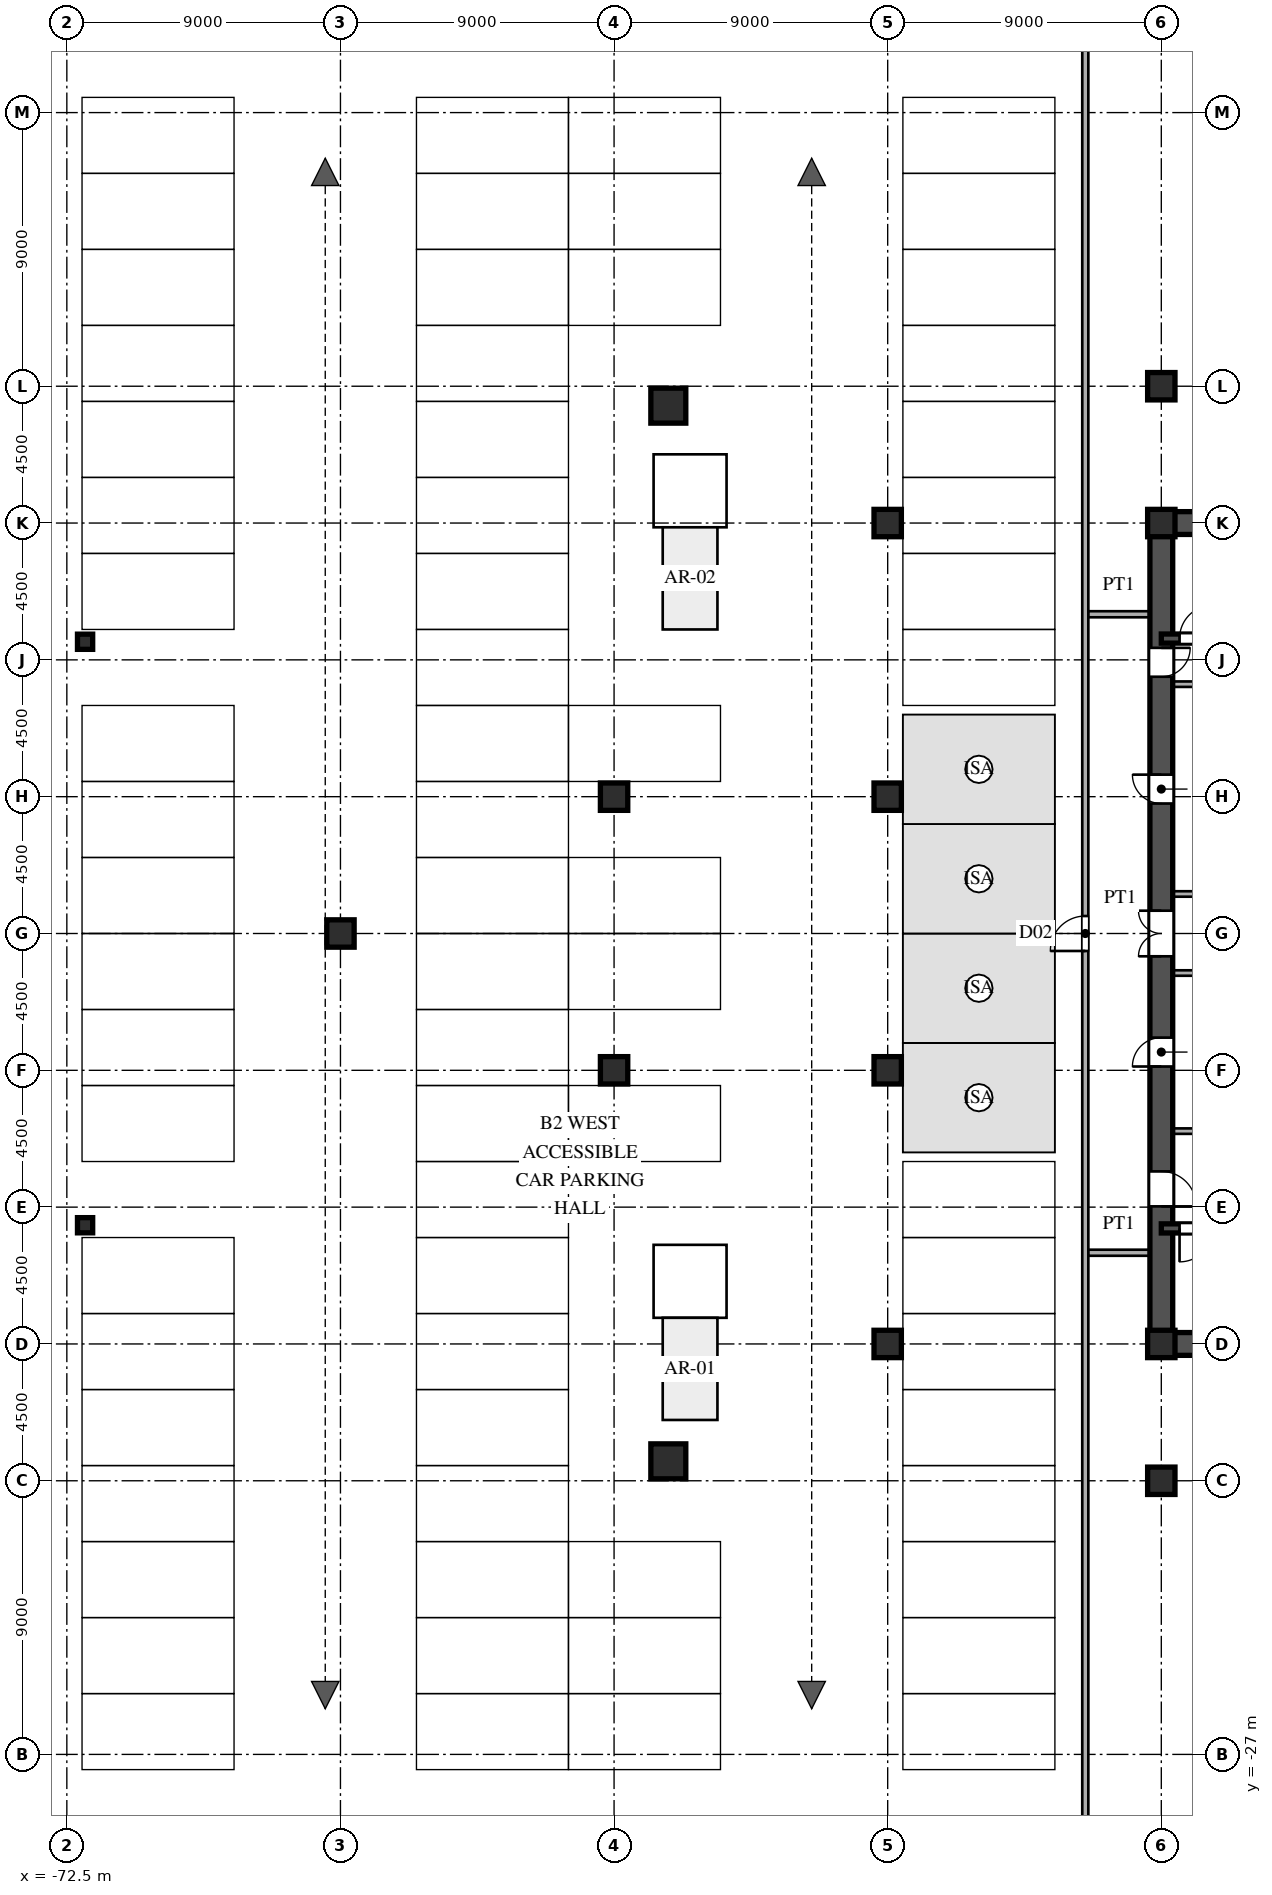
"""IFC4 building model, lengths in metres.
Left out: names, types, materials, properties, quantities, classifications, styles, units other than length and angle.
Written with IfcOpenShell. Run it as: python <this file> out.ifc"""

import sys

from ifc_helpers import new_model, si_unit, direction, frame, frame_2d, origin, origin_2d, place, context, subcontext, project, spatial, rectangle, hollow_rectangle, i_section, extrude, source, transform, mapped, element, fill, save


model = new_model("IFC4")
c1 = context("Model", 3, precision=1e-05, world=origin(), true_north=direction((0.0, 1.0)))
c2 = subcontext(c1, "Body", "Model", "MODEL_VIEW")
j1 = project(units=[si_unit("LENGTHUNIT", "METRE"), si_unit("PLANEANGLEUNIT", "RADIAN")], contexts=[c1])
p1 = place(None, origin())
s1 = spatial("IfcSite", under=j1, at=p1, CompositionType="ELEMENT")
p2 = place(p1, origin())
s2 = spatial("IfcBuilding", under=s1, at=p2, CompositionType="ELEMENT")
p3 = place(p2, frame((0.0, 0.0, -9.6)))
s3 = spatial("IfcBuildingStorey", under=s2, at=p3, CompositionType="ELEMENT", Elevation=-9.6)
m1 = source(origin(), c2, "Body", "SweptSolid", [
    extrude(i_section(OverallWidth=0.9, OverallDepth=0.9, WebThickness=0.036, FlangeThickness=0.055, at=origin_2d()), origin(), (0.0, 0.0, 1.0), 4.8),
])
for number, where, z_axis, x_axis in (
    (1, (-36.5, -18.0, 0.0), (0.0, 0.0, 1.0), (1.0, 0.0, 0.0)),
    (2, (-36.5, -13.5, 0.0), (0.0, 0.0, 1.0), (1.0, 0.0, 0.0)),
    (3, (-36.5, 13.5, 0.0), (0.0, 0.0, 1.0), (1.0, 0.0, 0.0)),
    (4, (-36.5, 18.0, 0.0), (0.0, 0.0, 1.0), (1.0, 0.0, 0.0)),
    (5, (-45.5, -13.5, 0.0), (0.0, 0.0, 1.0), (1.0, 0.0, 0.0)),
    (6, (-45.5, -4.5, 0.0), (0.0, 0.0, 1.0), (1.0, 0.0, 0.0)),
    (7, (-45.5, 4.5, 0.0), (0.0, 0.0, 1.0), (1.0, 0.0, 0.0)),
    (8, (-45.5, 13.5, 0.0), (0.0, 0.0, 1.0), (1.0, 0.0, 0.0)),
    (9, (-54.5, -4.5, 0.0), (0.0, 0.0, 1.0), (1.0, 0.0, 0.0)),
    (10, (-54.5, 4.5, 0.0), (0.0, 0.0, 1.0), (1.0, 0.0, 0.0)),
    (11, (-63.5, 0.0, 0.0), (0.0, 0.0, 1.0), (1.0, 0.0, 0.0)),
):
    element("IfcColumn", number, at=place(p3, frame(where, z_axis=z_axis, x_axis=x_axis)), inside=s3, PredefinedType="COLUMN", context=c2, shape_type="MappedRepresentation", body=[
        mapped(m1, transform((0.0, 0.0, 0.0), scale=1.0)),
    ])
m2 = source(origin(), c2, "Body", "SweptSolid", [
    extrude(hollow_rectangle(XDim=0.5, YDim=0.5, WallThickness=0.02, at=origin_2d()), origin(), (0.0, 0.0, 1.0), 4.8),
])
for number, where, z_axis, x_axis in (
    (12, (-71.9, 9.596, 0.0), (0.0, 0.0, 1.0), (1.0, 0.0, 0.0)),
    (13, (-71.9, -9.596, 0.0), (0.0, 0.0, 1.0), (1.0, 0.0, 0.0)),
):
    element("IfcColumn", number, at=place(p3, frame(where, z_axis=z_axis, x_axis=x_axis)), inside=s3, PredefinedType="COLUMN", context=c2, shape_type="MappedRepresentation", body=[
        mapped(m2, transform((0.0, 0.0, 0.0), scale=1.0)),
    ])
m3 = source(origin(), c2, "Body", "SweptSolid", [
    extrude(hollow_rectangle(XDim=1.15, YDim=1.15, WallThickness=0.048, at=origin_2d()), origin(), (0.0, 0.0, 1.0), 4.8),
])
for number, where, z_axis, x_axis in (
    (14, (-52.716, -17.361, 0.0), (0.0, 0.0, 1.0), (1.0, 0.0, 0.0)),
    (15, (-52.716, 17.361, 0.0), (0.0, 0.0, 1.0), (1.0, 0.0, 0.0)),
):
    element("IfcColumn", number, at=place(p3, frame(where, z_axis=z_axis, x_axis=x_axis)), inside=s3, PredefinedType="COLUMN", context=c2, shape_type="MappedRepresentation", body=[
        mapped(m3, transform((0.0, 0.0, 0.0), scale=1.0)),
    ])
for number, where, z_axis, x_axis in (
    (16, (-36.5, -13.5, 0.0), (0.0, 0.0, 1.0), (1.0, 0.0, 0.0)),
    (17, (-36.5, 13.5, 0.0), (0.0, 0.0, 1.0), (1.0, 0.0, 0.0)),
):
    element("IfcWall", number, at=place(p3, frame(where, z_axis=z_axis, x_axis=x_axis)), inside=s3, PredefinedType="SHEAR", context=c2, shape_type="SweptSolid", body=[
        extrude(rectangle(XDim=9.0, YDim=0.75, at=frame_2d((4.5, 0.0))), origin(), (0.0, 0.0, 1.0), 4.5),
    ])
p4 = place(p3, frame((-36.5, -13.65, 0.0), z_axis=(0.0, 0.0, 1.0), x_axis=(0.0, 1.0, 0.0)))
e18 = element("IfcWall", 18, at=p4, inside=s3, PredefinedType="SHEAR", context=c2, shape_type="SweptSolid", body=[
    extrude(rectangle(XDim=7.15, YDim=0.75, at=frame_2d((3.575, 0.0))), origin(), (0.0, 0.0, 1.0), 4.5),
])
p5 = place(p4, frame((4.675, 0.0, 0.0)))
e19 = element("IfcOpeningElement", 19, at=p5, cuts=e18, PredefinedType="OPENING", context=c2, shape_type="SweptSolid", body=[
    extrude(rectangle(XDim=1.15, YDim=2.2, at=frame_2d((0.575, 1.1))), frame((0.0, 0.385, 0.0), z_axis=(0.0, -1.0, 0.0), x_axis=(1.0, 0.0, 0.0)), (0.0, 0.0, 1.0), 0.77),
])
p6 = place(p3, frame((-36.5, -1.3, 0.0), z_axis=(0.0, 0.0, 1.0), x_axis=(0.0, 1.0, 0.0)))
e20 = element("IfcWall", 20, at=p6, inside=s3, PredefinedType="SHEAR", context=c2, shape_type="SweptSolid", body=[
    extrude(rectangle(XDim=2.6, YDim=0.75, at=frame_2d((1.3, 0.0))), origin(), (0.0, 0.0, 1.0), 4.5),
])
p7 = place(p6, frame((0.55, 0.0, 0.0)))
e21 = element("IfcOpeningElement", 21, at=p7, cuts=e20, PredefinedType="OPENING", context=c2, shape_type="SweptSolid", body=[
    extrude(rectangle(XDim=1.5, YDim=2.3, at=frame_2d((0.75, 1.15))), frame((0.0, 0.385, 0.0), z_axis=(0.0, -1.0, 0.0), x_axis=(1.0, 0.0, 0.0)), (0.0, 0.0, 1.0), 0.77),
])
p8 = place(p3, frame((-36.5, 8.2, 0.0), z_axis=(0.0, 0.0, 1.0), x_axis=(0.0, 1.0, 0.0)))
e22 = element("IfcWall", 22, at=p8, inside=s3, PredefinedType="SHEAR", context=c2, shape_type="SweptSolid", body=[
    extrude(rectangle(XDim=5.45, YDim=0.75, at=frame_2d((2.725, 0.0))), origin(), (0.0, 0.0, 1.0), 4.5),
])
p9 = place(p8, frame((0.245, 0.0, 0.0)))
e23 = element("IfcOpeningElement", 23, at=p9, cuts=e22, PredefinedType="OPENING", context=c2, shape_type="SweptSolid", body=[
    extrude(rectangle(XDim=0.95, YDim=2.15, at=frame_2d((0.475, 1.075))), frame((0.0, 0.385, 0.0), z_axis=(0.0, -1.0, 0.0), x_axis=(1.0, 0.0, 0.0)), (0.0, 0.0, 1.0), 0.77),
])
p10 = place(p3, frame((-36.5, -6.5, 0.0), z_axis=(0.0, 0.0, 1.0), x_axis=(0.0, 1.0, 0.0)))
e24 = element("IfcWall", 24, at=p10, inside=s3, PredefinedType="SHEAR", context=c2, shape_type="SweptSolid", body=[
    extrude(rectangle(XDim=5.2, YDim=0.75, at=frame_2d((2.6, 0.0))), origin(), (0.0, 0.0, 1.0), 4.5),
])
p11 = place(p10, frame((2.125, 0.0, 0.0)))
e25 = element("IfcOpeningElement", 25, at=p11, cuts=e24, PredefinedType="OPENING", context=c2, shape_type="SweptSolid", body=[
    extrude(rectangle(XDim=0.95, YDim=2.15, at=frame_2d((0.475, 1.075))), frame((0.0, 0.385, 0.0), z_axis=(0.0, -1.0, 0.0), x_axis=(1.0, 0.0, 0.0)), (0.0, 0.0, 1.0), 0.77),
])
p12 = place(p3, frame((-36.5, 1.3, 0.0), z_axis=(0.0, 0.0, 1.0), x_axis=(0.0, 1.0, 0.0)))
e26 = element("IfcWall", 26, at=p12, inside=s3, PredefinedType="SHEAR", context=c2, shape_type="SweptSolid", body=[
    extrude(rectangle(XDim=6.9, YDim=0.75, at=frame_2d((3.45, 0.0))), origin(), (0.0, 0.0, 1.0), 4.5),
])
p13 = place(p12, frame((2.975, 0.0, 0.0)))
e27 = element("IfcOpeningElement", 27, at=p13, cuts=e26, PredefinedType="OPENING", context=c2, shape_type="SweptSolid", body=[
    extrude(rectangle(XDim=0.95, YDim=2.15, at=frame_2d((0.475, 1.075))), frame((0.0, 0.385, 0.0), z_axis=(0.0, -1.0, 0.0), x_axis=(1.0, 0.0, 0.0)), (0.0, 0.0, 1.0), 0.77),
])
p14 = place(p3, frame((-36.5, -9.7, 0.0), z_axis=(0.0, 0.0, 1.0), x_axis=(1.0, 0.0, 0.0)))
e28 = element("IfcWall", 28, at=p14, inside=s3, PredefinedType="SHEAR", context=c2, shape_type="SweptSolid", body=[
    extrude(rectangle(XDim=9.0, YDim=0.3, at=frame_2d((4.5, 0.0))), origin(), (0.0, 0.0, 1.0), 4.5),
])
p15 = place(p14, frame((0.6, 0.0, 0.0)))
e29 = element("IfcOpeningElement", 29, at=p15, cuts=e28, PredefinedType="OPENING", context=c2, shape_type="SweptSolid", body=[
    extrude(rectangle(XDim=1.1, YDim=2.2, at=frame_2d((0.55, 1.1))), frame((0.0, 0.16, 0.0), z_axis=(0.0, -1.0, 0.0), x_axis=(1.0, 0.0, 0.0)), (0.0, 0.0, 1.0), 0.32),
])
p16 = place(p3, frame((-36.5, 9.7, 0.0), z_axis=(0.0, 0.0, 1.0), x_axis=(1.0, 0.0, 0.0)))
e30 = element("IfcWall", 30, at=p16, inside=s3, PredefinedType="SHEAR", context=c2, shape_type="SweptSolid", body=[
    extrude(rectangle(XDim=9.0, YDim=0.3, at=frame_2d((4.5, 0.0))), origin(), (0.0, 0.0, 1.0), 4.5),
])
p17 = place(p16, frame((0.6, 0.0, 0.0)))
e31 = element("IfcOpeningElement", 31, at=p17, cuts=e30, PredefinedType="OPENING", context=c2, shape_type="SweptSolid", body=[
    extrude(rectangle(XDim=1.1, YDim=2.2, at=frame_2d((0.55, 1.1))), frame((0.0, 0.16, 0.0), z_axis=(0.0, -1.0, 0.0), x_axis=(1.0, 0.0, 0.0)), (0.0, 0.0, 1.0), 0.32),
])
for number, where, z_axis, x_axis in (
    (32, (-36.15, -6.5, 0.0), (0.0, 0.0, 1.0), (1.0, 0.0, 0.0)),
    (33, (-36.15, 8.2, 0.0), (0.0, 0.0, 1.0), (1.0, 0.0, 0.0)),
):
    element("IfcWall", number, at=place(p3, frame(where, z_axis=z_axis, x_axis=x_axis)), inside=s3, PredefinedType="PARTITIONING", context=c2, shape_type="SweptSolid", body=[
        extrude(rectangle(XDim=5.7, YDim=0.18, at=frame_2d((2.85, 0.0))), origin(), (0.0, 0.0, 1.0), 4.5),
    ])
for number, where, z_axis, x_axis in (
    (34, (-36.15, -1.3, 0.0), (0.0, 0.0, 1.0), (1.0, 0.0, 0.0)),
    (35, (-36.15, 1.3, 0.0), (0.0, 0.0, 1.0), (1.0, 0.0, 0.0)),
):
    element("IfcWall", number, at=place(p3, frame(where, z_axis=z_axis, x_axis=x_axis)), inside=s3, PredefinedType="PARTITIONING", context=c2, shape_type="SweptSolid", body=[
        extrude(rectangle(XDim=2.95, YDim=0.18, at=frame_2d((1.475, 0.0))), origin(), (0.0, 0.0, 1.0), 4.5),
    ])
for number, where, z_axis, x_axis in (
    (36, (-38.915, -10.5, 0.0), (0.0, 0.0, 1.0), (1.0, 0.0, 0.0)),
    (37, (-38.915, 10.5, 0.0), (0.0, 0.0, 1.0), (1.0, 0.0, 0.0)),
):
    element("IfcWall", number, at=place(p3, frame(where, z_axis=z_axis, x_axis=x_axis)), inside=s3, PredefinedType="PARTITIONING", context=c2, shape_type="SweptSolid", body=[
        extrude(rectangle(XDim=2.035, YDim=0.2, at=frame_2d((1.018, 0.0))), origin(), (0.0, 0.0, 1.0), 4.5),
    ])
p18 = place(p3, frame((-39.0, -35.77, 0.0), z_axis=(0.0, 0.0, 1.0), x_axis=(0.0, 1.0, 0.0)))
e38 = element("IfcWall", 38, at=p18, inside=s3, PredefinedType="PARTITIONING", context=c2, shape_type="SweptSolid", body=[
    extrude(rectangle(XDim=71.54, YDim=0.2, at=frame_2d((35.77, 0.0))), origin(), (0.0, 0.0, 1.0), 4.5),
])
p19 = place(p18, frame((35.195, 0.0, 0.0)))
e39 = element("IfcOpeningElement", 39, at=p19, cuts=e38, PredefinedType="OPENING", context=c2, shape_type="SweptSolid", body=[
    extrude(rectangle(XDim=1.15, YDim=2.2, at=frame_2d((0.575, 1.1))), frame((0.0, 0.11, 0.0), z_axis=(0.0, -1.0, 0.0), x_axis=(1.0, 0.0, 0.0)), (0.0, 0.0, 1.0), 0.22),
])
m4 = source(origin(), c2, "Body", "SweptSolid", [
    extrude(rectangle(XDim=1.15, YDim=2.2, at=frame_2d((0.575, 1.1))), frame((0.0, 0.025, 0.0), z_axis=(0.0, -1.0, 0.0), x_axis=(1.0, 0.0, 0.0)), (0.0, 0.0, 1.0), 0.05),
])
p20 = place(p5, frame((1.15, 0.0, 0.0), z_axis=(0.0, 0.0, 1.0), x_axis=(-1.0, 0.0, 0.0)))
e40 = element("IfcDoor", 40, at=p20, inside=s3, OperationType="SINGLE_SWING_LEFT", PredefinedType="DOOR", context=c2, shape_type="MappedRepresentation", body=[
    mapped(m4, transform((0.0, 0.0, 0.0), scale=1.0)),
])
fill(e19, e40)
m5 = source(origin(), c2, "Body", "SweptSolid", [
    extrude(rectangle(XDim=1.5, YDim=2.3, at=frame_2d((0.75, 1.15))), frame((0.0, 0.025, 0.0), z_axis=(0.0, -1.0, 0.0), x_axis=(1.0, 0.0, 0.0)), (0.0, 0.0, 1.0), 0.05),
])
p21 = place(p7, origin())
e41 = element("IfcDoor", 41, at=p21, inside=s3, OperationType="DOUBLE_SWING_LEFT", PredefinedType="DOOR", context=c2, shape_type="MappedRepresentation", body=[
    mapped(m5, transform((0.0, 0.0, 0.0), scale=1.0)),
])
fill(e21, e41)
m6 = source(origin(), c2, "Body", "SweptSolid", [
    extrude(rectangle(XDim=0.95, YDim=2.15, at=frame_2d((0.475, 1.075))), frame((0.0, 0.025, 0.0), z_axis=(0.0, -1.0, 0.0), x_axis=(1.0, 0.0, 0.0)), (0.0, 0.0, 1.0), 0.05),
])
p22 = place(p9, frame((0.95, 0.0, 0.0), z_axis=(0.0, 0.0, 1.0), x_axis=(-1.0, 0.0, 0.0)))
e42 = element("IfcDoor", 42, at=p22, inside=s3, OperationType="SINGLE_SWING_RIGHT", PredefinedType="DOOR", context=c2, shape_type="MappedRepresentation", body=[
    mapped(m6, transform((0.0, 0.0, 0.0), scale=1.0)),
])
fill(e23, e42)
p23 = place(p11, origin())
e43 = element("IfcDoor", 43, at=p23, inside=s3, OperationType="SINGLE_SWING_LEFT", PredefinedType="DOOR", context=c2, shape_type="MappedRepresentation", body=[
    mapped(m6, transform((0.0, 0.0, 0.0), scale=1.0)),
])
fill(e25, e43)
p24 = place(p13, origin())
e44 = element("IfcDoor", 44, at=p24, inside=s3, OperationType="SINGLE_SWING_RIGHT", PredefinedType="DOOR", context=c2, shape_type="MappedRepresentation", body=[
    mapped(m6, transform((0.0, 0.0, 0.0), scale=1.0)),
])
fill(e27, e44)
m7 = source(origin(), c2, "Body", "SweptSolid", [
    extrude(rectangle(XDim=1.1, YDim=2.2, at=frame_2d((0.55, 1.1))), frame((0.0, 0.025, 0.0), z_axis=(0.0, -1.0, 0.0), x_axis=(1.0, 0.0, 0.0)), (0.0, 0.0, 1.0), 0.05),
])
p25 = place(p15, frame((1.1, 0.0, 0.0), z_axis=(0.0, 0.0, 1.0), x_axis=(-1.0, 0.0, 0.0)))
e45 = element("IfcDoor", 45, at=p25, inside=s3, OperationType="SINGLE_SWING_LEFT", PredefinedType="DOOR", context=c2, shape_type="MappedRepresentation", body=[
    mapped(m7, transform((0.0, 0.0, 0.0), scale=1.0)),
])
fill(e29, e45)
p26 = place(p17, origin())
e46 = element("IfcDoor", 46, at=p26, inside=s3, OperationType="SINGLE_SWING_RIGHT", PredefinedType="DOOR", context=c2, shape_type="MappedRepresentation", body=[
    mapped(m7, transform((0.0, 0.0, 0.0), scale=1.0)),
])
fill(e31, e46)
p27 = place(p19, origin())
e47 = element("IfcDoor", 47, at=p27, inside=s3, OperationType="SINGLE_SWING_LEFT", PredefinedType="DOOR", context=c2, shape_type="MappedRepresentation", body=[
    mapped(m4, transform((0.0, 0.0, 0.0), scale=1.0)),
])
fill(e39, e47)
save(model, sys.argv[1])
